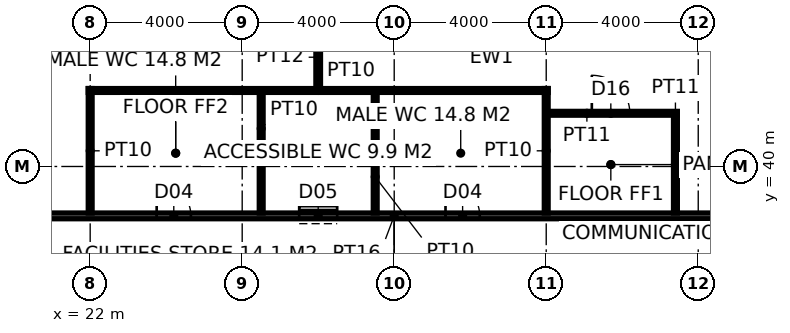
"""IFC4 building model, lengths in metres.
Left out: names, types, materials, properties, quantities, classifications, styles, units other than length and angle.
Written with IfcOpenShell. Run it as: python <this file> out.ifc"""

import sys

from ifc_helpers import new_model, si_unit, direction, frame, frame_2d, origin, place, context, subcontext, project, spatial, rectangle, extrude, element, fill, save


model = new_model("IFC4")
c1 = context("Model", 3, precision=1e-05, world=origin(), true_north=direction((0.0, 1.0)))
c2 = subcontext(c1, "Body", "Model", "MODEL_VIEW")
j1 = project(units=[si_unit("LENGTHUNIT", "METRE"), si_unit("PLANEANGLEUNIT", "RADIAN")], contexts=[c1])
p1 = place(None, origin())
s1 = spatial("IfcSite", under=j1, at=p1, CompositionType="ELEMENT")
p2 = place(p1, origin())
s2 = spatial("IfcBuilding", under=s1, at=p2, CompositionType="ELEMENT")
p3 = place(p2, frame((0.0, 0.0, 15.0)))
s3 = spatial("IfcBuildingStorey", under=s2, at=p3, CompositionType="ELEMENT", Elevation=15.0)
p4 = place(p3, frame((15.775, 38.7, 0.0), z_axis=(0.0, 0.0, 1.0), x_axis=(1.0, 0.0, 0.0)))
e1 = element("IfcWall", 1, at=p4, inside=s3, PredefinedType="PARTITIONING", context=c2, shape_type="SweptSolid", body=[
    extrude(rectangle(XDim=28.45, YDim=0.15, at=frame_2d((14.225, 0.0))), origin(), (0.0, 0.0, 1.0), 3.85),
])
p5 = place(p4, frame((7.975, 0.0, 0.0)))
e2 = element("IfcOpeningElement", 2, at=p5, cuts=e1, PredefinedType="OPENING", context=c2, shape_type="SweptSolid", body=[
    extrude(rectangle(XDim=0.9, YDim=2.1, at=frame_2d((0.45, 1.05))), frame((0.0, 0.085, 0.0), z_axis=(0.0, -1.0, 0.0), x_axis=(1.0, 0.0, 0.0)), (0.0, 0.0, 1.0), 0.17),
])
p6 = place(p4, frame((11.725, 0.0, 0.0)))
e3 = element("IfcOpeningElement", 3, at=p6, cuts=e1, PredefinedType="OPENING", context=c2, shape_type="SweptSolid", body=[
    extrude(rectangle(XDim=1.0, YDim=2.1, at=frame_2d((0.5, 1.05))), frame((0.0, 0.085, 0.0), z_axis=(0.0, -1.0, 0.0), x_axis=(1.0, 0.0, 0.0)), (0.0, 0.0, 1.0), 0.17),
])
p7 = place(p4, frame((15.575, 0.0, 0.0)))
e4 = element("IfcOpeningElement", 4, at=p7, cuts=e1, PredefinedType="OPENING", context=c2, shape_type="SweptSolid", body=[
    extrude(rectangle(XDim=0.9, YDim=2.1, at=frame_2d((0.45, 1.05))), frame((0.0, 0.085, 0.0), z_axis=(0.0, -1.0, 0.0), x_axis=(1.0, 0.0, 0.0)), (0.0, 0.0, 1.0), 0.17),
])
for number, where, z_axis, x_axis in (
    (5, (22.0, 38.775, 0.0), (0.0, 0.0, 1.0), (0.0, 1.0, 0.0)),
    (6, (34.0, 38.775, 0.0), (0.0, 0.0, 1.0), (0.0, 1.0, 0.0)),
):
    element("IfcWall", number, at=place(p3, frame(where, z_axis=z_axis, x_axis=x_axis)), inside=s3, PredefinedType="PARTITIONING", context=c2, shape_type="SweptSolid", body=[
        extrude(rectangle(XDim=3.275, YDim=0.1, at=frame_2d((1.638, 0.0))), origin(), (0.0, 0.0, 1.0), 2.95),
    ])
p8 = place(p3, frame((21.95, 42.0, 0.0), z_axis=(0.0, 0.0, 1.0), x_axis=(1.0, 0.0, 0.0)))
e7 = element("IfcWall", 7, at=p8, inside=s3, PredefinedType="PARTITIONING", context=c2, shape_type="SweptSolid", body=[
    extrude(rectangle(XDim=12.1, YDim=0.1, at=frame_2d((6.05, 0.0))), origin(), (0.0, 0.0, 1.0), 3.85),
])
for number, where, z_axis, x_axis in (
    (8, (26.5, 38.775, 0.0), (0.0, 0.0, 1.0), (0.0, 1.0, 0.0)),
    (9, (29.5, 38.775, 0.0), (0.0, 0.0, 1.0), (0.0, 1.0, 0.0)),
):
    element("IfcWall", number, at=place(p3, frame(where, z_axis=z_axis, x_axis=x_axis)), inside=s3, PredefinedType="PARTITIONING", context=c2, shape_type="SweptSolid", body=[
        extrude(rectangle(XDim=3.175, YDim=0.1, at=frame_2d((1.587, 0.0))), origin(), (0.0, 0.0, 1.0), 3.85),
    ])
p9 = place(p3, frame((28.0, 42.05, 0.0), z_axis=(0.0, 0.0, 1.0), x_axis=(0.0, 1.0, 0.0)))
e10 = element("IfcWall", 10, at=p9, inside=s3, PredefinedType="PARTITIONING", context=c2, shape_type="SweptSolid", body=[
    extrude(rectangle(XDim=1.65, YDim=0.12, at=frame_2d((0.825, 0.0))), origin(), (0.0, 0.0, 1.0), 3.85),
])
p10 = place(p3, frame((34.05, 41.4, 0.0), z_axis=(0.0, 0.0, 1.0), x_axis=(1.0, 0.0, 0.0)))
e11 = element("IfcWall", 11, at=p10, inside=s3, PredefinedType="PARTITIONING", context=c2, shape_type="SweptSolid", body=[
    extrude(rectangle(XDim=3.4, YDim=0.1, at=frame_2d((1.7, 0.0))), origin(), (0.0, 0.0, 1.0), 3.85),
])
p11 = place(p10, frame((1.15, 0.0, 0.0)))
e12 = element("IfcOpeningElement", 12, at=p11, cuts=e11, PredefinedType="OPENING", context=c2, shape_type="SweptSolid", body=[
    extrude(rectangle(XDim=1.0, YDim=2.2, at=frame_2d((0.5, 1.1))), frame((0.0, 0.06, 0.0), z_axis=(0.0, -1.0, 0.0), x_axis=(1.0, 0.0, 0.0)), (0.0, 0.0, 1.0), 0.12),
])
p12 = place(p3, frame((37.4, 38.775, 0.0), z_axis=(0.0, 0.0, 1.0), x_axis=(0.0, 1.0, 0.0)))
e13 = element("IfcWall", 13, at=p12, inside=s3, PredefinedType="PARTITIONING", context=c2, shape_type="SweptSolid", body=[
    extrude(rectangle(XDim=2.575, YDim=0.1, at=frame_2d((1.288, 0.0))), origin(), (0.0, 0.0, 1.0), 3.85),
])
p13 = place(p5, origin())
e14 = element("IfcDoor", 14, at=p13, inside=s3, OperationType="SINGLE_SWING_LEFT", PredefinedType="DOOR", context=c2, shape_type="SweptSolid", body=[
    extrude(rectangle(XDim=0.9, YDim=2.1, at=frame_2d((0.45, 1.05))), frame((0.0, 0.025, 0.0), z_axis=(0.0, -1.0, 0.0), x_axis=(1.0, 0.0, 0.0)), (0.0, 0.0, 1.0), 0.05),
])
fill(e2, e14)
p14 = place(p6, origin())
e15 = element("IfcDoor", 15, at=p14, inside=s3, OperationType="SLIDING_TO_LEFT", PredefinedType="DOOR", context=c2, shape_type="SweptSolid", body=[
    extrude(rectangle(XDim=1.0, YDim=2.1, at=frame_2d((0.5, 1.05))), frame((0.0, 0.025, 0.0), z_axis=(0.0, -1.0, 0.0), x_axis=(1.0, 0.0, 0.0)), (0.0, 0.0, 1.0), 0.05),
])
fill(e3, e15)
p15 = place(p7, origin())
e16 = element("IfcDoor", 16, at=p15, inside=s3, OperationType="SINGLE_SWING_LEFT", PredefinedType="DOOR", context=c2, shape_type="SweptSolid", body=[
    extrude(rectangle(XDim=0.9, YDim=2.1, at=frame_2d((0.45, 1.05))), frame((0.0, 0.025, 0.0), z_axis=(0.0, -1.0, 0.0), x_axis=(1.0, 0.0, 0.0)), (0.0, 0.0, 1.0), 0.05),
])
fill(e4, e16)
p16 = place(p11, origin())
e17 = element("IfcDoor", 17, at=p16, inside=s3, OperationType="SINGLE_SWING_LEFT", PredefinedType="DOOR", context=c2, shape_type="SweptSolid", body=[
    extrude(rectangle(XDim=1.0, YDim=2.2, at=frame_2d((0.5, 1.1))), frame((0.0, 0.025, 0.0), z_axis=(0.0, -1.0, 0.0), x_axis=(1.0, 0.0, 0.0)), (0.0, 0.0, 1.0), 0.05),
])
fill(e12, e17)
save(model, sys.argv[1])
